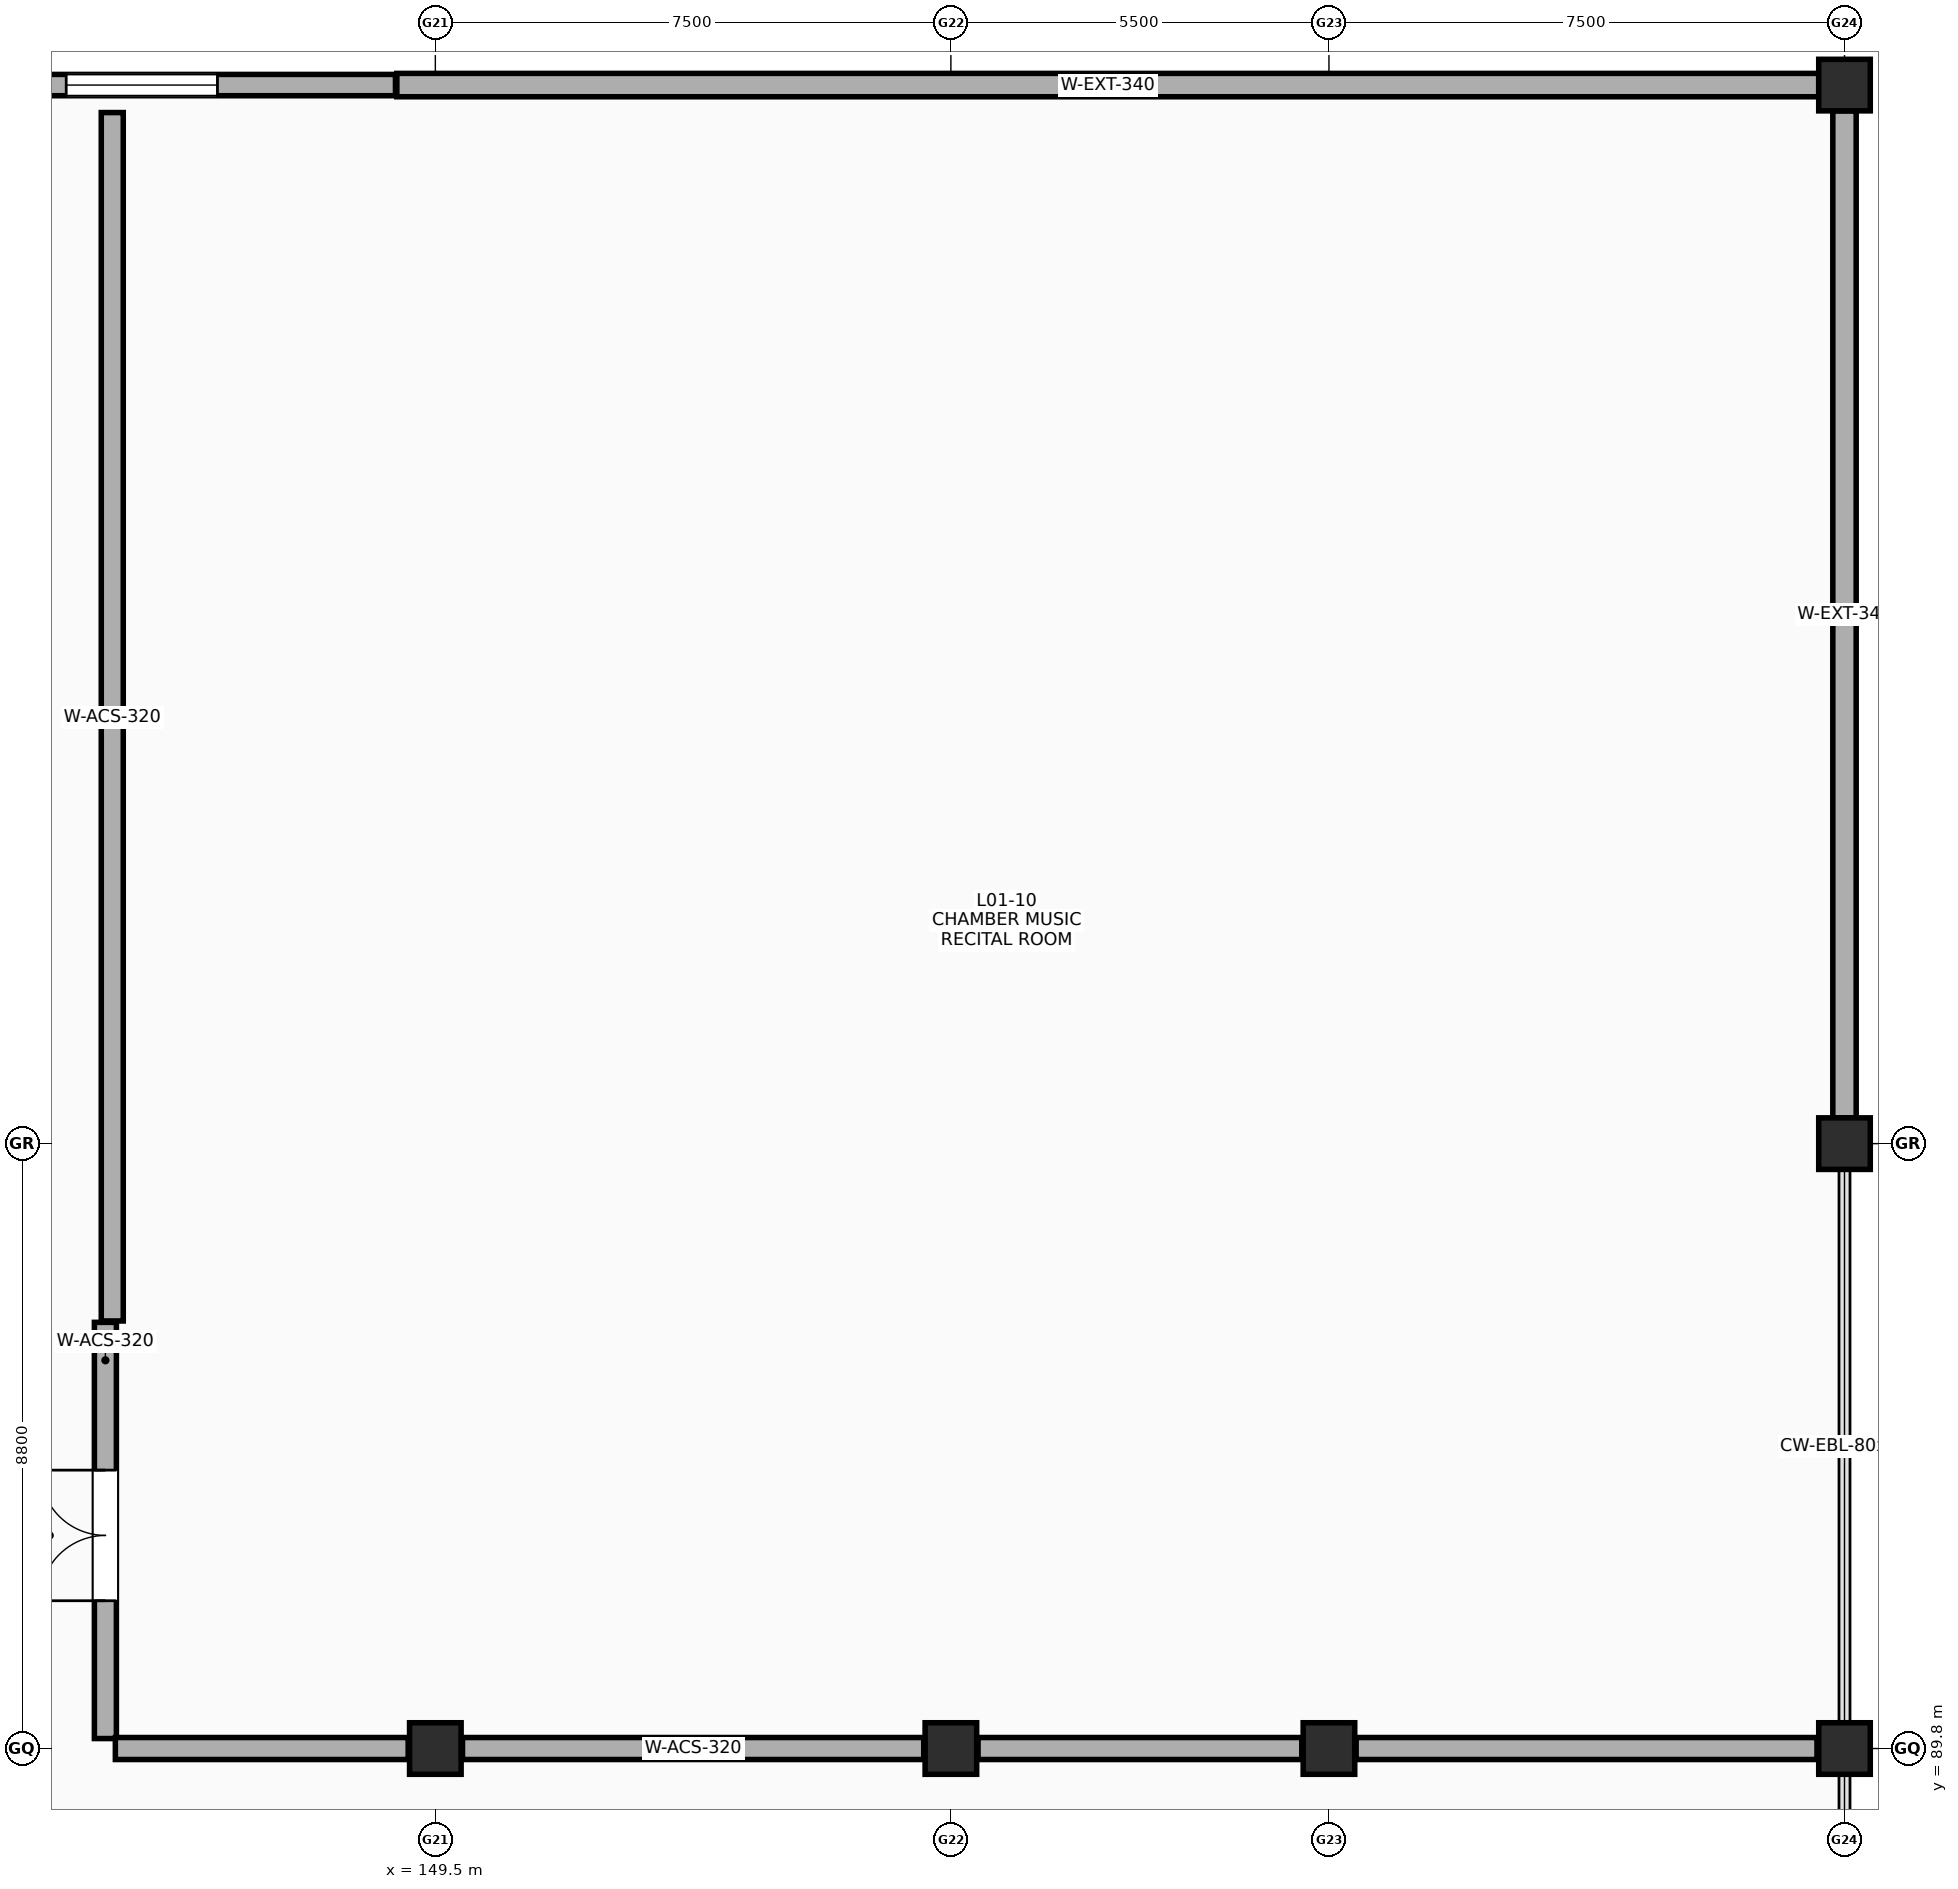
"""IFC4 building model, lengths in metres.
Left out: names, types, materials, properties, quantities, classifications, styles, units other than length and angle.
Written with IfcOpenShell. Run it as: python <this file> out.ifc"""

import sys

from ifc_helpers import new_model, si_unit, direction, frame, frame_2d, origin, origin_2d, place, context, subcontext, project, spatial, rectangle, extrude, element, fill, save


model = new_model("IFC4")
c1 = context("Model", 3, precision=1e-05, world=origin(), true_north=direction((0.0, 1.0)))
c2 = subcontext(c1, "Body", "Model", "MODEL_VIEW")
j1 = project(units=[si_unit("LENGTHUNIT", "METRE"), si_unit("PLANEANGLEUNIT", "RADIAN")], contexts=[c1])
p1 = place(None, origin())
s1 = spatial("IfcSite", under=j1, at=p1, CompositionType="ELEMENT")
p2 = place(p1, origin())
s2 = spatial("IfcBuilding", under=s1, at=p2, CompositionType="ELEMENT")
p3 = place(p2, frame((0.0, 0.0, 5.4)))
s3 = spatial("IfcBuildingStorey", under=s2, at=p3, CompositionType="ELEMENT", Elevation=5.4)
for number, where, z_axis, x_axis in (
    (1, (149.5, 89.8, 0.0), (0.0, 0.0, 1.0), (1.0, 0.0, 0.0)),
    (2, (157.0, 89.8, 0.0), (0.0, 0.0, 1.0), (1.0, 0.0, 0.0)),
    (3, (162.5, 89.8, 0.0), (0.0, 0.0, 1.0), (1.0, 0.0, 0.0)),
    (4, (170.0, 89.8, 0.0), (0.0, 0.0, 1.0), (1.0, 0.0, 0.0)),
    (5, (170.0, 98.6, 0.0), (0.0, 0.0, 1.0), (1.0, 0.0, 0.0)),
    (6, (170.0, 114.0, 0.0), (0.0, 0.0, 1.0), (1.0, 0.0, 0.0)),
):
    element("IfcColumn", number, at=place(p3, frame(where, z_axis=z_axis, x_axis=x_axis)), inside=s3, PredefinedType="COLUMN", context=c2, shape_type="SweptSolid", body=[
        extrude(rectangle(XDim=0.75, YDim=0.75, at=origin_2d()), origin(), (0.0, 0.0, 1.0), 4.4),
    ])
p4 = place(p3, frame((141.375, 114.0, 0.0), z_axis=(0.0, 0.0, 1.0), x_axis=(1.0, 0.0, 0.0)))
e7 = element("IfcWall", 7, at=p4, inside=s3, PredefinedType="SOLIDWALL", context=c2, shape_type="SweptSolid", body=[
    extrude(rectangle(XDim=7.545, YDim=0.31, at=frame_2d((3.772, 0.0))), origin(), (0.0, 0.0, 1.0), 2.82),
])
p5 = place(p4, frame((2.755, 0.0, 0.54)))
e8 = element("IfcOpeningElement", 8, at=p5, cuts=e7, PredefinedType="OPENING", context=c2, shape_type="SweptSolid", body=[
    extrude(rectangle(XDim=2.2, YDim=2.1, at=frame_2d((1.1, 1.05))), frame((0.0, 0.165, 0.0), z_axis=(0.0, -1.0, 0.0), x_axis=(1.0, 0.0, 0.0)), (0.0, 0.0, 1.0), 0.33),
])
p6 = place(p3, frame((170.0, 98.975, 0.0), z_axis=(0.0, 0.0, 1.0), x_axis=(0.0, 1.0, 0.0)))
e9 = element("IfcWall", 9, at=p6, inside=s3, PredefinedType="SOLIDWALL", context=c2, shape_type="SweptSolid", body=[
    extrude(rectangle(XDim=14.65, YDim=0.34, at=frame_2d((7.325, 0.0))), origin(), (0.0, 0.0, 1.0), 2.82),
])
p7 = place(p3, frame((144.7, 89.945, 0.0), z_axis=(0.0, 0.0, 1.0), x_axis=(0.0, 1.0, 0.0)))
e10 = element("IfcWall", 10, at=p7, inside=s3, PredefinedType="PARTITIONING", context=c2, shape_type="SweptSolid", body=[
    extrude(rectangle(XDim=6.055, YDim=0.32, at=frame_2d((3.027, 0.0))), origin(), (0.0, 0.0, 1.0), 3.22),
])
p8 = place(p7, frame((2.005, 0.0, 0.0)))
e11 = element("IfcOpeningElement", 11, at=p8, cuts=e10, PredefinedType="OPENING", context=c2, shape_type="SweptSolid", body=[
    extrude(rectangle(XDim=1.9, YDim=2.35, at=frame_2d((0.95, 1.175))), frame((0.0, 0.17, 0.0), z_axis=(0.0, -1.0, 0.0), x_axis=(1.0, 0.0, 0.0)), (0.0, 0.0, 1.0), 0.34),
])
p9 = place(p3, frame((144.845, 89.8, 0.0), z_axis=(0.0, 0.0, 1.0), x_axis=(1.0, 0.0, 0.0)))
e12 = element("IfcWall", 12, at=p9, inside=s3, PredefinedType="PARTITIONING", context=c2, shape_type="SweptSolid", body=[
    extrude(rectangle(XDim=4.26, YDim=0.32, at=frame_2d((2.13, 0.0))), origin(), (0.0, 0.0, 1.0), 3.22),
])
p10 = place(p3, frame((149.895, 89.8, 0.0), z_axis=(0.0, 0.0, 1.0), x_axis=(1.0, 0.0, 0.0)))
e13 = element("IfcWall", 13, at=p10, inside=s3, PredefinedType="PARTITIONING", context=c2, shape_type="SweptSolid", body=[
    extrude(rectangle(XDim=6.71, YDim=0.32, at=frame_2d((3.355, 0.0))), origin(), (0.0, 0.0, 1.0), 3.22),
])
p11 = place(p3, frame((157.395, 89.8, 0.0), z_axis=(0.0, 0.0, 1.0), x_axis=(1.0, 0.0, 0.0)))
e14 = element("IfcWall", 14, at=p11, inside=s3, PredefinedType="PARTITIONING", context=c2, shape_type="SweptSolid", body=[
    extrude(rectangle(XDim=4.71, YDim=0.32, at=frame_2d((2.355, 0.0))), origin(), (0.0, 0.0, 1.0), 3.42),
])
p12 = place(p3, frame((162.895, 89.8, 0.0), z_axis=(0.0, 0.0, 1.0), x_axis=(1.0, 0.0, 0.0)))
e15 = element("IfcWall", 15, at=p12, inside=s3, PredefinedType="PARTITIONING", context=c2, shape_type="SweptSolid", body=[
    extrude(rectangle(XDim=6.705, YDim=0.32, at=frame_2d((3.353, 0.0))), origin(), (0.0, 0.0, 1.0), 3.22),
])
p13 = place(p3, frame((148.94, 114.0, 0.0), z_axis=(0.0, 0.0, 1.0), x_axis=(1.0, 0.0, 0.0)))
e16 = element("IfcWall", 16, at=p13, inside=s3, PredefinedType="SOLIDWALL", context=c2, shape_type="SweptSolid", body=[
    extrude(rectangle(XDim=20.685, YDim=0.34, at=frame_2d((10.343, 0.0))), origin(), (0.0, 0.0, 1.0), 2.82),
])
p14 = place(p3, frame((144.8, 96.02, 0.0), z_axis=(0.0, 0.0, 1.0), x_axis=(0.0, 1.0, 0.0)))
e17 = element("IfcWall", 17, at=p14, inside=s3, PredefinedType="PARTITIONING", context=c2, shape_type="SweptSolid", body=[
    extrude(rectangle(XDim=17.58, YDim=0.32, at=frame_2d((8.79, 0.0))), origin(), (0.0, 0.0, 1.0), 2.82),
])
p15 = place(p5, origin())
e18 = element("IfcWindow", 18, at=p15, inside=s3, PartitioningType="SINGLE_PANEL", PredefinedType="WINDOW", context=c2, shape_type="SweptSolid", body=[
    extrude(rectangle(XDim=2.2, YDim=2.1, at=frame_2d((1.1, 1.05))), frame((0.0, 0.03, 0.0), z_axis=(0.0, -1.0, 0.0), x_axis=(1.0, 0.0, 0.0)), (0.0, 0.0, 1.0), 0.06),
])
fill(e8, e18)
p16 = place(p8, origin())
e19 = element("IfcDoor", 19, at=p16, inside=s3, OperationType="DOUBLE_DOOR_SINGLE_SWING", PredefinedType="DOOR", context=c2, shape_type="SweptSolid", body=[
    extrude(rectangle(XDim=1.9, YDim=2.35, at=frame_2d((0.95, 1.175))), frame((0.0, 0.025, 0.0), z_axis=(0.0, -1.0, 0.0), x_axis=(1.0, 0.0, 0.0)), (0.0, 0.0, 1.0), 0.05),
])
fill(e11, e19)
save(model, sys.argv[1])
